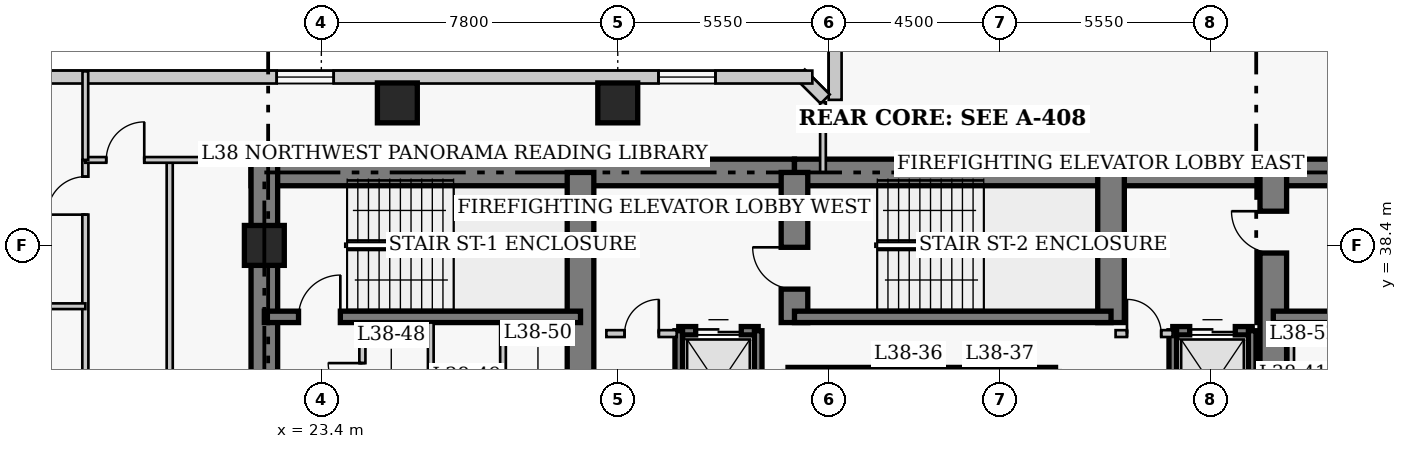
"""IFC4 building model, lengths in metres.
Left out: names, types, materials, properties, quantities, classifications, styles, units other than length and angle.
Written with IfcOpenShell. Run it as: python <this file> out.ifc"""

import sys

from ifc_helpers import new_model, si_unit, direction, frame, frame_2d, origin, origin_2d, place, context, subcontext, project, spatial, rectangle, extrude, element, fill, save


model = new_model("IFC4")
c1 = context("Model", 3, precision=1e-05, world=origin(), true_north=direction((0.0, 1.0)))
c2 = subcontext(c1, "Body", "Model", "MODEL_VIEW")
j1 = project(units=[si_unit("LENGTHUNIT", "METRE"), si_unit("PLANEANGLEUNIT", "RADIAN")], contexts=[c1])
p1 = place(None, origin())
s1 = spatial("IfcSite", under=j1, at=p1, CompositionType="ELEMENT")
p2 = place(p1, origin())
s2 = spatial("IfcBuilding", under=s1, at=p2, CompositionType="ELEMENT")
p3 = place(p2, frame((0.0, 0.0, 153.6)))
s3 = spatial("IfcBuildingStorey", under=s2, at=p3, CompositionType="ELEMENT", Elevation=153.6)
p4 = place(p3, frame((21.55, 40.32, 0.0), z_axis=(0.0, 0.0, 1.0), x_axis=(1.0, 0.0, 0.0)))
e1 = element("IfcWall", 1, at=p4, inside=s3, PredefinedType="SHEAR", context=c2, shape_type="SweptSolid", body=[
    extrude(rectangle(XDim=14.3, YDim=0.7, at=frame_2d((7.15, 0.0))), origin(), (0.0, 0.0, 1.0), 3.8),
])
p5 = place(p3, frame((35.85, 40.32, 0.0), z_axis=(0.0, 0.0, 1.0), x_axis=(1.0, 0.0, 0.0)))
e2 = element("IfcWall", 2, at=p5, inside=s3, PredefinedType="SHEAR", context=c2, shape_type="SweptSolid", body=[
    extrude(rectangle(XDim=12.6, YDim=0.7, at=frame_2d((6.3, 0.0))), origin(), (0.0, 0.0, 1.0), 3.8),
])
p6 = place(p3, frame((48.45, 40.32, 0.0), z_axis=(0.0, 0.0, 1.0), x_axis=(1.0, 0.0, 0.0)))
e3 = element("IfcWall", 3, at=p6, inside=s3, PredefinedType="SHEAR", context=c2, shape_type="SweptSolid", body=[
    extrude(rectangle(XDim=8.77, YDim=0.7, at=frame_2d((4.385, 0.0))), origin(), (0.0, 0.0, 1.0), 3.8),
])
p7 = place(p3, frame((21.9, 27.05, 0.0), z_axis=(0.0, 0.0, 1.0), x_axis=(0.0, 1.0, 0.0)))
e4 = element("IfcWall", 4, at=p7, inside=s3, PredefinedType="SHEAR", context=c2, shape_type="SweptSolid", body=[
    extrude(rectangle(XDim=13.62, YDim=0.7, at=frame_2d((6.81, 0.0))), origin(), (0.0, 0.0, 1.0), 3.8),
])
p8 = place(p3, frame((30.22, 33.1, 0.0), z_axis=(0.0, 0.0, 1.0), x_axis=(0.0, 1.0, 0.0)))
e5 = element("IfcWall", 5, at=p8, inside=s3, PredefinedType="SHEAR", context=c2, shape_type="SweptSolid", body=[
    extrude(rectangle(XDim=7.22, YDim=0.7, at=frame_2d((3.61, 0.0))), origin(), (0.0, 0.0, 1.0), 3.8),
])
p9 = place(p3, frame((35.85, 36.37, 0.0), z_axis=(0.0, 0.0, 1.0), x_axis=(0.0, 1.0, 0.0)))
e6 = element("IfcWall", 6, at=p9, inside=s3, PredefinedType="SHEAR", context=c2, shape_type="SweptSolid", body=[
    extrude(rectangle(XDim=3.95, YDim=0.7, at=frame_2d((1.975, 0.0))), origin(), (0.0, 0.0, 1.0), 3.8),
])
p10 = place(p9, frame((0.88, 0.0, 0.0)))
e7 = element("IfcOpeningElement", 7, at=p10, cuts=e6, PredefinedType="OPENING", context=c2, shape_type="SweptSolid", body=[
    extrude(rectangle(XDim=1.1, YDim=2.15, at=frame_2d((0.55, 1.075))), frame((0.0, 0.36, 0.0), z_axis=(0.0, -1.0, 0.0), x_axis=(1.0, 0.0, 0.0)), (0.0, 0.0, 1.0), 0.72),
])
p11 = place(p3, frame((44.18, 36.37, 0.0), z_axis=(0.0, 0.0, 1.0), x_axis=(0.0, 1.0, 0.0)))
e8 = element("IfcWall", 8, at=p11, inside=s3, PredefinedType="SHEAR", context=c2, shape_type="SweptSolid", body=[
    extrude(rectangle(XDim=3.95, YDim=0.7, at=frame_2d((1.975, 0.0))), origin(), (0.0, 0.0, 1.0), 3.8),
])
p12 = place(p3, frame((48.45, 32.4, 0.0), z_axis=(0.0, 0.0, 1.0), x_axis=(0.0, 1.0, 0.0)))
e9 = element("IfcWall", 9, at=p12, inside=s3, PredefinedType="SHEAR", context=c2, shape_type="SweptSolid", body=[
    extrude(rectangle(XDim=7.92, YDim=0.7, at=frame_2d((3.96, 0.0))), origin(), (0.0, 0.0, 1.0), 3.8),
])
p13 = place(p12, frame((5.8, 0.0, 0.0)))
e10 = element("IfcOpeningElement", 10, at=p13, cuts=e9, PredefinedType="OPENING", context=c2, shape_type="SweptSolid", body=[
    extrude(rectangle(XDim=1.1, YDim=2.15, at=frame_2d((0.55, 1.075))), frame((0.0, 0.36, 0.0), z_axis=(0.0, -1.0, 0.0), x_axis=(1.0, 0.0, 0.0)), (0.0, 0.0, 1.0), 0.72),
])
p14 = place(p3, frame((21.9, 36.52, 0.0), z_axis=(0.0, 0.0, 1.0), x_axis=(1.0, 0.0, 0.0)))
e11 = element("IfcWall", 11, at=p14, inside=s3, PredefinedType="SHEAR", context=c2, shape_type="SweptSolid", body=[
    extrude(rectangle(XDim=8.32, YDim=0.3, at=frame_2d((4.16, 0.0))), origin(), (0.0, 0.0, 1.0), 3.8),
])
p15 = place(p14, frame((0.9, 0.0, 0.0)))
e12 = element("IfcOpeningElement", 12, at=p15, cuts=e11, PredefinedType="OPENING", context=c2, shape_type="SweptSolid", body=[
    extrude(rectangle(XDim=1.1, YDim=2.15, at=frame_2d((0.55, 1.075))), frame((0.0, 0.16, 0.0), z_axis=(0.0, -1.0, 0.0), x_axis=(1.0, 0.0, 0.0)), (0.0, 0.0, 1.0), 0.32),
])
p16 = place(p3, frame((35.85, 36.52, 0.0), z_axis=(0.0, 0.0, 1.0), x_axis=(1.0, 0.0, 0.0)))
e13 = element("IfcWall", 13, at=p16, inside=s3, PredefinedType="SHEAR", context=c2, shape_type="SweptSolid", body=[
    extrude(rectangle(XDim=8.33, YDim=0.3, at=frame_2d((4.165, 0.0))), origin(), (0.0, 0.0, 1.0), 3.8),
])
p17 = place(p3, frame((48.45, 36.52, 0.0), z_axis=(0.0, 0.0, 1.0), x_axis=(1.0, 0.0, 0.0)))
e14 = element("IfcWall", 14, at=p17, inside=s3, PredefinedType="SHEAR", context=c2, shape_type="SweptSolid", body=[
    extrude(rectangle(XDim=8.42, YDim=0.3, at=frame_2d((4.21, 0.0))), origin(), (0.0, 0.0, 1.0), 3.8),
])
for number, where, z_axis, x_axis in (
    (15, (21.9, 38.4, 0.0), (0.0, 0.0, 1.0), (1.0, 0.0, 0.0)),
    (16, (25.4, 42.15, 0.0), (0.0, 0.0, 1.0), (1.0, 0.0, 0.0)),
    (17, (31.2, 42.15, 0.0), (0.0, 0.0, 1.0), (1.0, 0.0, 0.0)),
):
    element("IfcColumn", number, at=place(p3, frame(where, z_axis=z_axis, x_axis=x_axis)), inside=s3, PredefinedType="COLUMN", context=c2, shape_type="SweptSolid", body=[
        extrude(rectangle(XDim=1.05, YDim=1.05, at=origin_2d()), origin(), (0.0, 0.0, 1.0), 3.8),
    ])
p18 = place(p3, frame((36.92, 44.37, 0.0), z_axis=(0.0, 0.0, 1.0), x_axis=(0.0, -1.0, 0.0)))
e18 = element("IfcWall", 18, at=p18, inside=s3, PredefinedType="SOLIDWALL", context=c2, shape_type="SweptSolid", body=[
    extrude(rectangle(XDim=2.14, YDim=0.34, at=frame_2d((1.07, 0.0))), origin(), (0.0, 0.0, 1.0), 3.55),
])
p19 = place(p3, frame((36.658, 42.251, 0.0), z_axis=(0.0, 0.0, 1.0), x_axis=(-0.707106781187, 0.707106781187, 0.0)))
e19 = element("IfcWall", 19, at=p19, inside=s3, PredefinedType="SOLIDWALL", context=c2, shape_type="SweptSolid", body=[
    extrude(rectangle(XDim=0.929, YDim=0.34, at=frame_2d((0.464, 0.0))), origin(), (0.0, 0.0, 1.0), 3.55),
])
p20 = place(p3, frame((36.32, 42.83, 0.0), z_axis=(0.0, 0.0, 1.0), x_axis=(-1.0, 0.0, 0.0)))
e20 = element("IfcWall", 20, at=p20, inside=s3, PredefinedType="SOLIDWALL", context=c2, shape_type="SweptSolid", body=[
    extrude(rectangle(XDim=26.69, YDim=0.34, at=frame_2d((13.345, 0.0))), origin(), (0.0, 0.0, 1.0), 3.55),
])
p21 = place(p20, frame((2.548, 0.0, 0.85)))
e21 = element("IfcOpeningElement", 21, at=p21, cuts=e20, PredefinedType="OPENING", context=c2, shape_type="SweptSolid", body=[
    extrude(rectangle(XDim=1.5, YDim=1.75, at=frame_2d((0.75, 0.875))), frame((0.0, 0.18, 0.0), z_axis=(0.0, -1.0, 0.0), x_axis=(1.0, 0.0, 0.0)), (0.0, 0.0, 1.0), 0.36),
])
p22 = place(p20, frame((12.595, 0.0, 0.85)))
e22 = element("IfcOpeningElement", 22, at=p22, cuts=e20, PredefinedType="OPENING", context=c2, shape_type="SweptSolid", body=[
    extrude(rectangle(XDim=1.5, YDim=1.75, at=frame_2d((0.75, 0.875))), frame((0.0, 0.18, 0.0), z_axis=(0.0, -1.0, 0.0), x_axis=(1.0, 0.0, 0.0)), (0.0, 0.0, 1.0), 0.36),
])
p23 = place(p20, frame((21.492, 0.0, 0.85)))
e23 = element("IfcOpeningElement", 23, at=p23, cuts=e20, PredefinedType="OPENING", context=c2, shape_type="SweptSolid", body=[
    extrude(rectangle(XDim=1.5, YDim=1.75, at=frame_2d((0.75, 0.875))), frame((0.0, 0.18, 0.0), z_axis=(0.0, -1.0, 0.0), x_axis=(1.0, 0.0, 0.0)), (0.0, 0.0, 1.0), 0.36),
])
p24 = place(p3, frame((35.68, 35.08, 0.0), z_axis=(0.0, 0.0, 1.0), x_axis=(1.0, 0.0, 0.0)))
e24 = element("IfcWall", 24, at=p24, inside=s3, PredefinedType="SHEAR", context=c2, shape_type="SweptSolid", body=[
    extrude(rectangle(XDim=2.32, YDim=0.22, at=frame_2d((1.16, 0.0))), origin(), (0.0, 0.0, 1.0), 3.8),
])
p25 = place(p3, frame((38.0, 35.08, 0.0), z_axis=(0.0, 0.0, 1.0), x_axis=(1.0, 0.0, 0.0)))
e25 = element("IfcWall", 25, at=p25, inside=s3, PredefinedType="SHEAR", context=c2, shape_type="SweptSolid", body=[
    extrude(rectangle(XDim=2.4, YDim=0.22, at=frame_2d((1.2, 0.0))), origin(), (0.0, 0.0, 1.0), 3.8),
])
p26 = place(p3, frame((40.4, 35.08, 0.0), z_axis=(0.0, 0.0, 1.0), x_axis=(1.0, 0.0, 0.0)))
e26 = element("IfcWall", 26, at=p26, inside=s3, PredefinedType="SHEAR", context=c2, shape_type="SweptSolid", body=[
    extrude(rectangle(XDim=2.32, YDim=0.22, at=frame_2d((1.16, 0.0))), origin(), (0.0, 0.0, 1.0), 3.8),
])
p27 = place(p3, frame((32.805, 36.155, 0.0), z_axis=(0.0, 0.0, 1.0), x_axis=(1.0, 0.0, 0.0)))
e27 = element("IfcWall", 27, at=p27, inside=s3, PredefinedType="SHEAR", context=c2, shape_type="SweptSolid", body=[
    extrude(rectangle(XDim=2.09, YDim=0.22, at=frame_2d((1.045, 0.0))), origin(), (0.0, 0.0, 1.0), 3.8),
])
p28 = place(p27, frame((0.445, 0.0, 0.0)))
e28 = element("IfcOpeningElement", 28, at=p28, cuts=e27, PredefinedType="OPENING", context=c2, shape_type="SweptSolid", body=[
    extrude(rectangle(XDim=1.2, YDim=2.15, at=frame_2d((0.6, 1.075))), frame((0.0, 0.12, 0.0), z_axis=(0.0, -1.0, 0.0), x_axis=(1.0, 0.0, 0.0)), (0.0, 0.0, 1.0), 0.24),
])
for number, where, z_axis, x_axis in (
    (29, (32.805, 33.245, 0.0), (0.0, 0.0, 1.0), (0.0, 1.0, 0.0)),
    (30, (34.895, 33.245, 0.0), (0.0, 0.0, 1.0), (0.0, 1.0, 0.0)),
):
    element("IfcWall", number, at=place(p3, frame(where, z_axis=z_axis, x_axis=x_axis)), inside=s3, PredefinedType="SHEAR", context=c2, shape_type="SweptSolid", body=[
        extrude(rectangle(XDim=2.91, YDim=0.2, at=frame_2d((1.455, 0.0))), origin(), (0.0, 0.0, 1.0), 3.8),
    ])
p29 = place(p3, frame((45.805, 36.155, 0.0), z_axis=(0.0, 0.0, 1.0), x_axis=(1.0, 0.0, 0.0)))
e31 = element("IfcWall", 31, at=p29, inside=s3, PredefinedType="SHEAR", context=c2, shape_type="SweptSolid", body=[
    extrude(rectangle(XDim=2.09, YDim=0.22, at=frame_2d((1.045, 0.0))), origin(), (0.0, 0.0, 1.0), 3.8),
])
p30 = place(p29, frame((0.445, 0.0, 0.0)))
e32 = element("IfcOpeningElement", 32, at=p30, cuts=e31, PredefinedType="OPENING", context=c2, shape_type="SweptSolid", body=[
    extrude(rectangle(XDim=1.2, YDim=2.15, at=frame_2d((0.6, 1.075))), frame((0.0, 0.12, 0.0), z_axis=(0.0, -1.0, 0.0), x_axis=(1.0, 0.0, 0.0)), (0.0, 0.0, 1.0), 0.24),
])
p31 = place(p3, frame((45.805, 32.65, 0.0), z_axis=(0.0, 0.0, 1.0), x_axis=(0.0, 1.0, 0.0)))
e33 = element("IfcWall", 33, at=p31, inside=s3, PredefinedType="SHEAR", context=c2, shape_type="SweptSolid", body=[
    extrude(rectangle(XDim=3.505, YDim=0.2, at=frame_2d((1.752, 0.0))), origin(), (0.0, 0.0, 1.0), 3.8),
])
p32 = place(p3, frame((47.895, 33.245, 0.0), z_axis=(0.0, 0.0, 1.0), x_axis=(0.0, 1.0, 0.0)))
e34 = element("IfcWall", 34, at=p32, inside=s3, PredefinedType="SHEAR", context=c2, shape_type="SweptSolid", body=[
    extrude(rectangle(XDim=2.91, YDim=0.2, at=frame_2d((1.455, 0.0))), origin(), (0.0, 0.0, 1.0), 3.8),
])
p33 = place(p3, frame((30.9, 36.08, 0.0), z_axis=(0.0, 0.0, 1.0), x_axis=(1.0, 0.0, 0.0)))
e35 = element("IfcWall", 35, at=p33, inside=s3, PredefinedType="PARTITIONING", context=c2, shape_type="SweptSolid", body=[
    extrude(rectangle(XDim=1.85, YDim=0.18, at=frame_2d((0.925, 0.0))), origin(), (0.0, 0.0, 1.0), 3.55),
])
p34 = place(p33, frame((0.48, 0.0, 0.0)))
e36 = element("IfcOpeningElement", 36, at=p34, cuts=e35, PredefinedType="OPENING", context=c2, shape_type="SweptSolid", body=[
    extrude(rectangle(XDim=0.9, YDim=2.15, at=frame_2d((0.45, 1.075))), frame((0.0, 0.1, 0.0), z_axis=(0.0, -1.0, 0.0), x_axis=(1.0, 0.0, 0.0)), (0.0, 0.0, 1.0), 0.2),
])
p35 = place(p3, frame((44.3, 36.08, 0.0), z_axis=(0.0, 0.0, 1.0), x_axis=(1.0, 0.0, 0.0)))
e37 = element("IfcWall", 37, at=p35, inside=s3, PredefinedType="PARTITIONING", context=c2, shape_type="SweptSolid", body=[
    extrude(rectangle(XDim=1.5, YDim=0.18, at=frame_2d((0.75, 0.0))), origin(), (0.0, 0.0, 1.0), 3.55),
])
p36 = place(p35, frame((0.3, 0.0, 0.0)))
e38 = element("IfcOpeningElement", 38, at=p36, cuts=e37, PredefinedType="OPENING", context=c2, shape_type="SweptSolid", body=[
    extrude(rectangle(XDim=0.9, YDim=2.15, at=frame_2d((0.45, 1.075))), frame((0.0, 0.1, 0.0), z_axis=(0.0, -1.0, 0.0), x_axis=(1.0, 0.0, 0.0)), (0.0, 0.0, 1.0), 0.2),
])
p37 = place(p3, frame((24.48, 32.8, 0.0), z_axis=(0.0, 0.0, 1.0), x_axis=(0.0, 1.0, 0.0)))
e39 = element("IfcWall", 39, at=p37, inside=s3, PredefinedType="PARTITIONING", context=c2, shape_type="SweptSolid", body=[
    extrude(rectangle(XDim=3.57, YDim=0.16, at=frame_2d((1.785, 0.0))), origin(), (0.0, 0.0, 1.0), 3.55),
])
p38 = place(p37, frame((1.604, 0.0, 0.0)))
e40 = element("IfcOpeningElement", 40, at=p38, cuts=e39, PredefinedType="OPENING", context=c2, shape_type="SweptSolid", body=[
    extrude(rectangle(XDim=0.9, YDim=2.1, at=frame_2d((0.45, 1.05))), frame((0.0, 0.09, 0.0), z_axis=(0.0, -1.0, 0.0), x_axis=(1.0, 0.0, 0.0)), (0.0, 0.0, 1.0), 0.18),
])
for number, where, z_axis, x_axis in (
    (41, (48.92, 32.75, 0.0), (0.0, 0.0, 1.0), (0.0, 1.0, 0.0)),
    (42, (26.28, 32.75, 0.0), (0.0, 0.0, 1.0), (0.0, 1.0, 0.0)),
    (43, (28.18, 32.75, 0.0), (0.0, 0.0, 1.0), (0.0, 1.0, 0.0)),
):
    element("IfcWall", number, at=place(p3, frame(where, z_axis=z_axis, x_axis=x_axis)), inside=s3, PredefinedType="PARTITIONING", context=c2, shape_type="SweptSolid", body=[
        extrude(rectangle(XDim=3.62, YDim=0.15, at=frame_2d((1.81, 0.0))), origin(), (0.0, 0.0, 1.0), 3.55),
    ])
p39 = place(p3, frame((17.19, 6.85, 0.0), z_axis=(0.0, 0.0, 1.0), x_axis=(0.0, 1.0, 0.0)))
e44 = element("IfcWall", 44, at=p39, inside=s3, PredefinedType="PARTITIONING", context=c2, shape_type="SweptSolid", body=[
    extrude(rectangle(XDim=33.8, YDim=0.16, at=frame_2d((16.9, 0.0))), origin(), (0.0, 0.0, 1.0), 3.55),
])
p40 = place(p39, frame((1.7, 0.0, 0.0)))
e45 = element("IfcOpeningElement", 45, at=p40, cuts=e44, PredefinedType="OPENING", context=c2, shape_type="SweptSolid", body=[
    extrude(rectangle(XDim=0.95, YDim=2.1, at=frame_2d((0.475, 1.05))), frame((0.0, 0.09, 0.0), z_axis=(0.0, -1.0, 0.0), x_axis=(1.0, 0.0, 0.0)), (0.0, 0.0, 1.0), 0.18),
])
p41 = place(p39, frame((8.275, 0.0, 0.0)))
e46 = element("IfcOpeningElement", 46, at=p41, cuts=e44, PredefinedType="OPENING", context=c2, shape_type="SweptSolid", body=[
    extrude(rectangle(XDim=0.95, YDim=2.1, at=frame_2d((0.475, 1.05))), frame((0.0, 0.09, 0.0), z_axis=(0.0, -1.0, 0.0), x_axis=(1.0, 0.0, 0.0)), (0.0, 0.0, 1.0), 0.18),
])
p42 = place(p39, frame((14.543, 0.0, 0.0)))
e47 = element("IfcOpeningElement", 47, at=p42, cuts=e44, PredefinedType="OPENING", context=c2, shape_type="SweptSolid", body=[
    extrude(rectangle(XDim=0.95, YDim=2.1, at=frame_2d((0.475, 1.05))), frame((0.0, 0.09, 0.0), z_axis=(0.0, -1.0, 0.0), x_axis=(1.0, 0.0, 0.0)), (0.0, 0.0, 1.0), 0.18),
])
p43 = place(p39, frame((32.36, 0.0, 0.0)))
e48 = element("IfcOpeningElement", 48, at=p43, cuts=e44, PredefinedType="OPENING", context=c2, shape_type="SweptSolid", body=[
    extrude(rectangle(XDim=1.0, YDim=2.15, at=frame_2d((0.5, 1.075))), frame((0.0, 0.09, 0.0), z_axis=(0.0, -1.0, 0.0), x_axis=(1.0, 0.0, 0.0)), (0.0, 0.0, 1.0), 0.18),
])
p44 = place(p3, frame((19.41, 35.02, 0.0), z_axis=(0.0, 0.0, 1.0), x_axis=(0.0, 1.0, 0.0)))
e49 = element("IfcWall", 49, at=p44, inside=s3, PredefinedType="PARTITIONING", context=c2, shape_type="SweptSolid", body=[
    extrude(rectangle(XDim=5.63, YDim=0.16, at=frame_2d((2.815, 0.0))), origin(), (0.0, 0.0, 1.0), 3.55),
])
p45 = place(p3, frame((17.19, 40.65, 0.0), z_axis=(0.0, 0.0, 1.0), x_axis=(1.0, 0.0, 0.0)))
e50 = element("IfcWall", 50, at=p45, inside=s3, PredefinedType="PARTITIONING", context=c2, shape_type="SweptSolid", body=[
    extrude(rectangle(XDim=4.91, YDim=0.15, at=frame_2d((2.455, 0.0))), origin(), (0.0, 0.0, 1.0), 3.55),
])
p46 = place(p45, frame((0.55, 0.0, 0.0)))
e51 = element("IfcOpeningElement", 51, at=p46, cuts=e50, PredefinedType="OPENING", context=c2, shape_type="SweptSolid", body=[
    extrude(rectangle(XDim=1.0, YDim=2.15, at=frame_2d((0.5, 1.075))), frame((0.0, 0.085, 0.0), z_axis=(0.0, -1.0, 0.0), x_axis=(1.0, 0.0, 0.0)), (0.0, 0.0, 1.0), 0.17),
])
p47 = place(p3, frame((17.19, 40.65, 0.0), z_axis=(0.0, 0.0, 1.0), x_axis=(0.0, 1.0, 0.0)))
e52 = element("IfcWall", 52, at=p47, inside=s3, PredefinedType="PARTITIONING", context=c2, shape_type="SweptSolid", body=[
    extrude(rectangle(XDim=2.33, YDim=0.15, at=frame_2d((1.165, 0.0))), origin(), (0.0, 0.0, 1.0), 3.55),
])
p48 = place(p3, frame((36.6, 40.32, 0.0), z_axis=(0.0, 0.0, 1.0), x_axis=(0.0, 1.0, 0.0)))
e53 = element("IfcWall", 53, at=p48, inside=s3, PredefinedType="PARTITIONING", context=c2, shape_type="SweptSolid", body=[
    extrude(rectangle(XDim=1.845, YDim=0.15, at=frame_2d((0.922, 0.0))), origin(), (0.0, 0.0, 1.0), 3.55),
])
p49 = place(p3, frame((14.45, 36.8, 0.0), z_axis=(0.0, 0.0, 1.0), x_axis=(1.0, 0.0, 0.0)))
e54 = element("IfcWall", 54, at=p49, inside=s3, PredefinedType="PARTITIONING", context=c2, shape_type="SweptSolid", body=[
    extrude(rectangle(XDim=2.74, YDim=0.15, at=frame_2d((1.37, 0.0))), origin(), (0.0, 0.0, 1.0), 3.55),
])
p50 = place(p21, origin())
e55 = element("IfcWindow", 55, at=p50, inside=s3, PartitioningType="SINGLE_PANEL", PredefinedType="WINDOW", context=c2, shape_type="SweptSolid", body=[
    extrude(rectangle(XDim=1.5, YDim=1.75, at=frame_2d((0.75, 0.875))), frame((0.0, 0.03, 0.0), z_axis=(0.0, -1.0, 0.0), x_axis=(1.0, 0.0, 0.0)), (0.0, 0.0, 1.0), 0.06),
])
fill(e21, e55)
p51 = place(p22, origin())
e56 = element("IfcWindow", 56, at=p51, inside=s3, PartitioningType="SINGLE_PANEL", PredefinedType="WINDOW", context=c2, shape_type="SweptSolid", body=[
    extrude(rectangle(XDim=1.5, YDim=1.75, at=frame_2d((0.75, 0.875))), frame((0.0, 0.03, 0.0), z_axis=(0.0, -1.0, 0.0), x_axis=(1.0, 0.0, 0.0)), (0.0, 0.0, 1.0), 0.06),
])
fill(e22, e56)
p52 = place(p28, origin())
e57 = element("IfcDoor", 57, at=p52, inside=s3, OperationType="DOUBLE_DOOR_SLIDING", PredefinedType="DOOR", context=c2, shape_type="SweptSolid", body=[
    extrude(rectangle(XDim=1.2, YDim=2.15, at=frame_2d((0.6, 1.075))), frame((0.0, 0.025, 0.0), z_axis=(0.0, -1.0, 0.0), x_axis=(1.0, 0.0, 0.0)), (0.0, 0.0, 1.0), 0.05),
])
fill(e28, e57)
p53 = place(p30, origin())
e58 = element("IfcDoor", 58, at=p53, inside=s3, OperationType="DOUBLE_DOOR_SLIDING", PredefinedType="DOOR", context=c2, shape_type="SweptSolid", body=[
    extrude(rectangle(XDim=1.2, YDim=2.15, at=frame_2d((0.6, 1.075))), frame((0.0, 0.025, 0.0), z_axis=(0.0, -1.0, 0.0), x_axis=(1.0, 0.0, 0.0)), (0.0, 0.0, 1.0), 0.05),
])
fill(e32, e58)
p54 = place(p34, origin())
e59 = element("IfcDoor", 59, at=p54, inside=s3, OperationType="SINGLE_SWING_RIGHT", PredefinedType="DOOR", context=c2, shape_type="SweptSolid", body=[
    extrude(rectangle(XDim=0.9, YDim=2.15, at=frame_2d((0.45, 1.075))), frame((0.0, 0.025, 0.0), z_axis=(0.0, -1.0, 0.0), x_axis=(1.0, 0.0, 0.0)), (0.0, 0.0, 1.0), 0.05),
])
fill(e36, e59)
p55 = place(p36, origin())
e60 = element("IfcDoor", 60, at=p55, inside=s3, OperationType="SINGLE_SWING_LEFT", PredefinedType="DOOR", context=c2, shape_type="SweptSolid", body=[
    extrude(rectangle(XDim=0.9, YDim=2.15, at=frame_2d((0.45, 1.075))), frame((0.0, 0.025, 0.0), z_axis=(0.0, -1.0, 0.0), x_axis=(1.0, 0.0, 0.0)), (0.0, 0.0, 1.0), 0.05),
])
fill(e38, e60)
p56 = place(p38, origin())
e61 = element("IfcDoor", 61, at=p56, inside=s3, OperationType="SINGLE_SWING_RIGHT", PredefinedType="DOOR", context=c2, shape_type="SweptSolid", body=[
    extrude(rectangle(XDim=0.9, YDim=2.1, at=frame_2d((0.45, 1.05))), frame((0.0, 0.025, 0.0), z_axis=(0.0, -1.0, 0.0), x_axis=(1.0, 0.0, 0.0)), (0.0, 0.0, 1.0), 0.05),
])
fill(e40, e61)
p57 = place(p46, origin())
e62 = element("IfcDoor", 62, at=p57, inside=s3, OperationType="SINGLE_SWING_RIGHT", PredefinedType="DOOR", context=c2, shape_type="SweptSolid", body=[
    extrude(rectangle(XDim=1.0, YDim=2.15, at=frame_2d((0.5, 1.075))), frame((0.0, 0.025, 0.0), z_axis=(0.0, -1.0, 0.0), x_axis=(1.0, 0.0, 0.0)), (0.0, 0.0, 1.0), 0.05),
])
fill(e51, e62)
p58 = place(p43, origin())
e63 = element("IfcDoor", 63, at=p58, inside=s3, OperationType="SINGLE_SWING_LEFT", PredefinedType="DOOR", context=c2, shape_type="SweptSolid", body=[
    extrude(rectangle(XDim=1.0, YDim=2.15, at=frame_2d((0.5, 1.075))), frame((0.0, 0.025, 0.0), z_axis=(0.0, -1.0, 0.0), x_axis=(1.0, 0.0, 0.0)), (0.0, 0.0, 1.0), 0.05),
])
fill(e48, e63)
p59 = place(p15, origin())
e64 = element("IfcDoor", 64, at=p59, inside=s3, OperationType="SINGLE_SWING_RIGHT", PredefinedType="DOOR", context=c2, shape_type="SweptSolid", body=[
    extrude(rectangle(XDim=1.1, YDim=2.15, at=frame_2d((0.55, 1.075))), frame((0.0, 0.025, 0.0), z_axis=(0.0, -1.0, 0.0), x_axis=(1.0, 0.0, 0.0)), (0.0, 0.0, 1.0), 0.05),
])
fill(e12, e64)
p60 = place(p10, origin())
e65 = element("IfcDoor", 65, at=p60, inside=s3, OperationType="SINGLE_SWING_RIGHT", PredefinedType="DOOR", context=c2, shape_type="SweptSolid", body=[
    extrude(rectangle(XDim=1.1, YDim=2.15, at=frame_2d((0.55, 1.075))), frame((0.0, 0.025, 0.0), z_axis=(0.0, -1.0, 0.0), x_axis=(1.0, 0.0, 0.0)), (0.0, 0.0, 1.0), 0.05),
])
fill(e7, e65)
p61 = place(p13, origin())
e66 = element("IfcDoor", 66, at=p61, inside=s3, OperationType="SINGLE_SWING_RIGHT", PredefinedType="DOOR", context=c2, shape_type="SweptSolid", body=[
    extrude(rectangle(XDim=1.1, YDim=2.15, at=frame_2d((0.55, 1.075))), frame((0.0, 0.025, 0.0), z_axis=(0.0, -1.0, 0.0), x_axis=(1.0, 0.0, 0.0)), (0.0, 0.0, 1.0), 0.05),
])
fill(e10, e66)
save(model, sys.argv[1])
